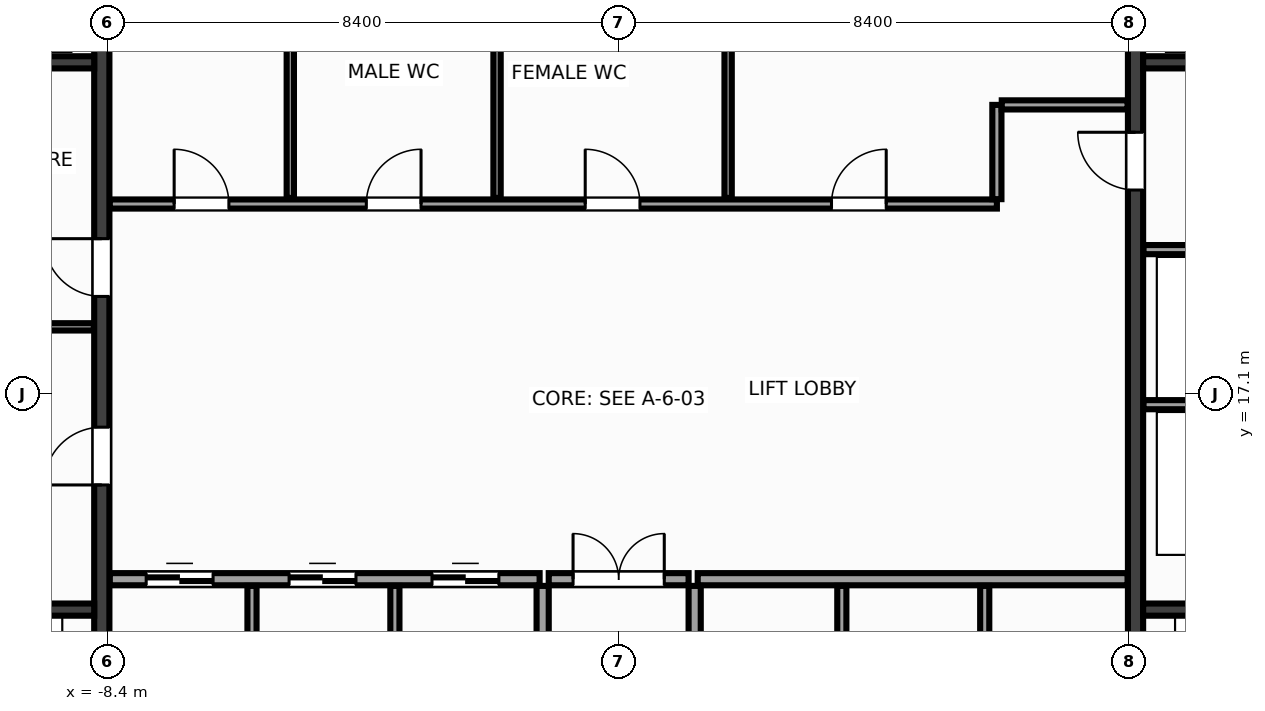
"""IFC4 building model, lengths in metres.
Left out: names, types, materials, properties, quantities, classifications, styles, units other than length and angle.
Written with IfcOpenShell. Run it as: python <this file> out.ifc"""

import sys

from ifc_helpers import new_model, si_unit, direction, frame, frame_2d, origin, place, context, subcontext, project, spatial, rectangle, extrude, source, transform, mapped, element, fill, save


model = new_model("IFC4")
c1 = context("Model", 3, precision=1e-05, world=origin(), true_north=direction((0.0, 1.0)))
c2 = subcontext(c1, "Body", "Model", "MODEL_VIEW")
j1 = project(units=[si_unit("LENGTHUNIT", "METRE"), si_unit("PLANEANGLEUNIT", "RADIAN")], contexts=[c1])
p1 = place(None, origin())
s1 = spatial("IfcSite", under=j1, at=p1, CompositionType="ELEMENT")
p2 = place(p1, origin())
s2 = spatial("IfcBuilding", under=s1, at=p2, CompositionType="ELEMENT")
p3 = place(p2, frame((0.0, 0.0, 41.6)))
s3 = spatial("IfcBuildingStorey", under=s2, at=p3, CompositionType="ELEMENT", Elevation=41.6)
m1 = source(origin(), c2, "Body", "SweptSolid", [
    extrude(rectangle(XDim=12.8, YDim=0.25, at=frame_2d((6.4, 0.0))), origin(), (0.0, 0.0, 1.0), 3.6),
])
p4 = place(p3, frame((-8.5, 10.6, 0.0), z_axis=(0.0, 0.0, 1.0), x_axis=(0.0, 1.0, 0.0)))
e1 = element("IfcWall", 1, at=p4, inside=s3, PredefinedType="SHEAR", context=c2, shape_type="MappedRepresentation", body=[
    mapped(m1, transform((0.0, 0.0, 0.0), x_axis=(1.0, 0.0, 0.0), y_axis=(0.0, 1.0, 0.0), z_axis=(0.0, 0.0, 1.0), scale=1.0)),
])
p5 = place(p4, frame((5.0, 0.0, 0.0)))
e2 = element("IfcOpeningElement", 2, at=p5, cuts=e1, PredefinedType="OPENING", context=c2, shape_type="SweptSolid", body=[
    extrude(rectangle(XDim=0.95, YDim=2.15, at=frame_2d((0.475, 1.075))), frame((0.0, 0.137, 0.0), z_axis=(0.0, -1.0, 0.0), x_axis=(1.0, 0.0, 0.0)), (0.0, 0.0, 1.0), 0.274),
])
p6 = place(p4, frame((8.1, 0.0, 0.0)))
e3 = element("IfcOpeningElement", 3, at=p6, cuts=e1, PredefinedType="OPENING", context=c2, shape_type="SweptSolid", body=[
    extrude(rectangle(XDim=0.95, YDim=2.15, at=frame_2d((0.475, 1.075))), frame((0.0, 0.137, 0.0), z_axis=(0.0, -1.0, 0.0), x_axis=(1.0, 0.0, 0.0)), (0.0, 0.0, 1.0), 0.274),
])
p7 = place(p3, frame((8.5, 10.6, 0.0), z_axis=(0.0, 0.0, 1.0), x_axis=(0.0, 1.0, 0.0)))
e4 = element("IfcWall", 4, at=p7, inside=s3, PredefinedType="SHEAR", context=c2, shape_type="MappedRepresentation", body=[
    mapped(m1, transform((0.0, 0.0, 0.0), x_axis=(1.0, 0.0, 0.0), y_axis=(0.0, 1.0, 0.0), z_axis=(0.0, 0.0, 1.0), scale=1.0)),
])
p8 = place(p7, frame((9.85, 0.0, 0.0)))
e5 = element("IfcOpeningElement", 5, at=p8, cuts=e4, PredefinedType="OPENING", context=c2, shape_type="SweptSolid", body=[
    extrude(rectangle(XDim=0.95, YDim=2.15, at=frame_2d((0.475, 1.075))), frame((0.0, 0.137, 0.0), z_axis=(0.0, -1.0, 0.0), x_axis=(1.0, 0.0, 0.0)), (0.0, 0.0, 1.0), 0.274),
])
m2 = source(origin(), c2, "Body", "SweptSolid", [
    extrude(rectangle(XDim=2.825, YDim=0.2, at=frame_2d((1.413, 0.0))), origin(), (0.0, 0.0, 1.0), 3.6),
])
for number, where, z_axis, x_axis in (
    (6, (-11.45, 13.55, 0.0), (0.0, 0.0, 1.0), (1.0, 0.0, 0.0)),
    (7, (8.625, 13.55, 0.0), (0.0, 0.0, 1.0), (1.0, 0.0, 0.0)),
):
    element("IfcWall", number, at=place(p3, frame(where, z_axis=z_axis, x_axis=x_axis)), inside=s3, PredefinedType="SHEAR", context=c2, shape_type="MappedRepresentation", body=[
        mapped(m2, transform((0.0, 0.0, 0.0), x_axis=(1.0, 0.0, 0.0), y_axis=(0.0, 1.0, 0.0), z_axis=(0.0, 0.0, 1.0), scale=1.0)),
    ])
m3 = source(origin(), c2, "Body", "SweptSolid", [
    extrude(rectangle(XDim=3.02, YDim=0.2, at=frame_2d((1.51, 0.0))), origin(), (0.0, 0.0, 1.0), 3.6),
])
for number, where, z_axis, x_axis in (
    (8, (-11.645, 22.55, 0.0), (0.0, 0.0, 1.0), (1.0, 0.0, 0.0)),
    (9, (8.625, 22.55, 0.0), (0.0, 0.0, 1.0), (1.0, 0.0, 0.0)),
):
    element("IfcWall", number, at=place(p3, frame(where, z_axis=z_axis, x_axis=x_axis)), inside=s3, PredefinedType="SHEAR", context=c2, shape_type="MappedRepresentation", body=[
        mapped(m3, transform((0.0, 0.0, 0.0), x_axis=(1.0, 0.0, 0.0), y_axis=(0.0, 1.0, 0.0), z_axis=(0.0, 0.0, 1.0), scale=1.0)),
    ])
m4 = source(origin(), c2, "Body", "SweptSolid", [
    extrude(rectangle(XDim=3.01, YDim=0.12, at=frame_2d((1.505, 0.0))), origin(), (0.0, 0.0, 1.0), 3.36),
])
p9 = place(p3, frame((-11.64, 18.2, 0.0), z_axis=(0.0, 0.0, 1.0), x_axis=(1.0, 0.0, 0.0)))
e10 = element("IfcWall", 10, at=p9, inside=s3, PredefinedType="PARTITIONING", context=c2, shape_type="MappedRepresentation", body=[
    mapped(m4, transform((0.0, 0.0, 0.0), x_axis=(1.0, 0.0, 0.0), y_axis=(0.0, 1.0, 0.0), z_axis=(0.0, 0.0, 1.0), scale=1.0)),
])
m5 = source(origin(), c2, "Body", "SweptSolid", [
    extrude(rectangle(XDim=3.01, YDim=0.15, at=frame_2d((1.505, 0.0))), origin(), (0.0, 0.0, 1.0), 3.36),
])
for number, where, z_axis, x_axis in (
    (11, (8.63, 16.92, 0.0), (0.0, 0.0, 1.0), (1.0, 0.0, 0.0)),
    (12, (8.63, 19.47, 0.0), (0.0, 0.0, 1.0), (1.0, 0.0, 0.0)),
):
    element("IfcWall", number, at=place(p3, frame(where, z_axis=z_axis, x_axis=x_axis)), inside=s3, PredefinedType="PARTITIONING", context=c2, shape_type="MappedRepresentation", body=[
        mapped(m5, transform((0.0, 0.0, 0.0), x_axis=(1.0, 0.0, 0.0), y_axis=(0.0, 1.0, 0.0), z_axis=(0.0, 0.0, 1.0), scale=1.0)),
    ])
m6 = source(origin(), c2, "Body", "SweptSolid", [
    extrude(rectangle(XDim=7.07, YDim=0.2, at=frame_2d((3.535, 0.0))), origin(), (0.0, 0.0, 1.0), 3.36),
])
p10 = place(p3, frame((-8.37, 14.05, 0.0), z_axis=(0.0, 0.0, 1.0), x_axis=(1.0, 0.0, 0.0)))
e13 = element("IfcWall", 13, at=p10, inside=s3, PredefinedType="PARTITIONING", context=c2, shape_type="MappedRepresentation", body=[
    mapped(m6, transform((0.0, 0.0, 0.0), x_axis=(1.0, 0.0, 0.0), y_axis=(0.0, 1.0, 0.0), z_axis=(0.0, 0.0, 1.0), scale=1.0)),
])
p11 = place(p10, frame((0.6, 0.0, 0.0)))
e14 = element("IfcOpeningElement", 14, at=p11, cuts=e13, PredefinedType="OPENING", context=c2, shape_type="SweptSolid", body=[
    extrude(rectangle(XDim=1.1, YDim=2.15, at=frame_2d((0.55, 1.075))), frame((0.0, 0.112, 0.0), z_axis=(0.0, -1.0, 0.0), x_axis=(1.0, 0.0, 0.0)), (0.0, 0.0, 1.0), 0.224),
])
p12 = place(p10, frame((2.95, 0.0, 0.0)))
e15 = element("IfcOpeningElement", 15, at=p12, cuts=e13, PredefinedType="OPENING", context=c2, shape_type="SweptSolid", body=[
    extrude(rectangle(XDim=1.1, YDim=2.15, at=frame_2d((0.55, 1.075))), frame((0.0, 0.112, 0.0), z_axis=(0.0, -1.0, 0.0), x_axis=(1.0, 0.0, 0.0)), (0.0, 0.0, 1.0), 0.224),
])
p13 = place(p10, frame((5.3, 0.0, 0.0)))
e16 = element("IfcOpeningElement", 16, at=p13, cuts=e13, PredefinedType="OPENING", context=c2, shape_type="SweptSolid", body=[
    extrude(rectangle(XDim=1.1, YDim=2.15, at=frame_2d((0.55, 1.075))), frame((0.0, 0.112, 0.0), z_axis=(0.0, -1.0, 0.0), x_axis=(1.0, 0.0, 0.0)), (0.0, 0.0, 1.0), 0.224),
])
p14 = place(p3, frame((1.3, 14.05, 0.0), z_axis=(0.0, 0.0, 1.0), x_axis=(1.0, 0.0, 0.0)))
e17 = element("IfcWall", 17, at=p14, inside=s3, PredefinedType="PARTITIONING", context=c2, shape_type="MappedRepresentation", body=[
    mapped(m6, transform((0.0, 0.0, 0.0), x_axis=(1.0, 0.0, 0.0), y_axis=(0.0, 1.0, 0.0), z_axis=(0.0, 0.0, 1.0), scale=1.0)),
])
m7 = source(origin(), c2, "Body", "SweptSolid", [
    extrude(rectangle(XDim=3.34, YDim=0.2, at=frame_2d((1.67, 0.0))), origin(), (0.0, 0.0, 1.0), 3.36),
])
for number, where, z_axis, x_axis in (
    (18, (-1.25, 10.6, 0.0), (0.0, 0.0, 1.0), (0.0, 1.0, 0.0)),
    (19, (1.25, 10.6, 0.0), (0.0, 0.0, 1.0), (0.0, 1.0, 0.0)),
):
    element("IfcWall", number, at=place(p3, frame(where, z_axis=z_axis, x_axis=x_axis)), inside=s3, PredefinedType="PARTITIONING", context=c2, shape_type="MappedRepresentation", body=[
        mapped(m7, transform((0.0, 0.0, 0.0), x_axis=(1.0, 0.0, 0.0), y_axis=(0.0, 1.0, 0.0), z_axis=(0.0, 0.0, 1.0), scale=1.0)),
    ])
m8 = source(origin(), c2, "Body", "SweptSolid", [
    extrude(rectangle(XDim=2.3, YDim=0.2, at=frame_2d((1.15, 0.0))), origin(), (0.0, 0.0, 1.0), 3.36),
])
p15 = place(p3, frame((-1.15, 14.05, 0.0), z_axis=(0.0, 0.0, 1.0), x_axis=(1.0, 0.0, 0.0)))
e20 = element("IfcWall", 20, at=p15, inside=s3, PredefinedType="PARTITIONING", context=c2, shape_type="MappedRepresentation", body=[
    mapped(m8, transform((0.0, 0.0, 0.0), x_axis=(1.0, 0.0, 0.0), y_axis=(0.0, 1.0, 0.0), z_axis=(0.0, 0.0, 1.0), scale=1.0)),
])
p16 = place(p15, frame((0.4, 0.0, 0.0)))
e21 = element("IfcOpeningElement", 21, at=p16, cuts=e20, PredefinedType="OPENING", context=c2, shape_type="SweptSolid", body=[
    extrude(rectangle(XDim=1.5, YDim=2.2, at=frame_2d((0.75, 1.1))), frame((0.0, 0.112, 0.0), z_axis=(0.0, -1.0, 0.0), x_axis=(1.0, 0.0, 0.0)), (0.0, 0.0, 1.0), 0.224),
])
m9 = source(origin(), c2, "Body", "SweptSolid", [
    extrude(rectangle(XDim=14.59, YDim=0.15, at=frame_2d((7.295, 0.0))), origin(), (0.0, 0.0, 1.0), 3.36),
])
p17 = place(p3, frame((-8.37, 20.22, 0.0), z_axis=(0.0, 0.0, 1.0), x_axis=(1.0, 0.0, 0.0)))
e22 = element("IfcWall", 22, at=p17, inside=s3, PredefinedType="PARTITIONING", context=c2, shape_type="MappedRepresentation", body=[
    mapped(m9, transform((0.0, 0.0, 0.0), x_axis=(1.0, 0.0, 0.0), y_axis=(0.0, 1.0, 0.0), z_axis=(0.0, 0.0, 1.0), scale=1.0)),
])
p18 = place(p17, frame((1.06, 0.0, 0.0)))
e23 = element("IfcOpeningElement", 23, at=p18, cuts=e22, PredefinedType="OPENING", context=c2, shape_type="SweptSolid", body=[
    extrude(rectangle(XDim=0.9, YDim=2.15, at=frame_2d((0.45, 1.075))), frame((0.0, 0.087, 0.0), z_axis=(0.0, -1.0, 0.0), x_axis=(1.0, 0.0, 0.0)), (0.0, 0.0, 1.0), 0.174),
])
p19 = place(p17, frame((4.22, 0.0, 0.0)))
e24 = element("IfcOpeningElement", 24, at=p19, cuts=e22, PredefinedType="OPENING", context=c2, shape_type="SweptSolid", body=[
    extrude(rectangle(XDim=0.9, YDim=2.15, at=frame_2d((0.45, 1.075))), frame((0.0, 0.087, 0.0), z_axis=(0.0, -1.0, 0.0), x_axis=(1.0, 0.0, 0.0)), (0.0, 0.0, 1.0), 0.174),
])
p20 = place(p17, frame((7.82, 0.0, 0.0)))
e25 = element("IfcOpeningElement", 25, at=p20, cuts=e22, PredefinedType="OPENING", context=c2, shape_type="SweptSolid", body=[
    extrude(rectangle(XDim=0.9, YDim=2.15, at=frame_2d((0.45, 1.075))), frame((0.0, 0.087, 0.0), z_axis=(0.0, -1.0, 0.0), x_axis=(1.0, 0.0, 0.0)), (0.0, 0.0, 1.0), 0.174),
])
p21 = place(p17, frame((11.87, 0.0, 0.0)))
e26 = element("IfcOpeningElement", 26, at=p21, cuts=e22, PredefinedType="OPENING", context=c2, shape_type="SweptSolid", body=[
    extrude(rectangle(XDim=0.9, YDim=2.15, at=frame_2d((0.45, 1.075))), frame((0.0, 0.087, 0.0), z_axis=(0.0, -1.0, 0.0), x_axis=(1.0, 0.0, 0.0)), (0.0, 0.0, 1.0), 0.174),
])
m10 = source(origin(), c2, "Body", "SweptSolid", [
    extrude(rectangle(XDim=1.55, YDim=0.15, at=frame_2d((0.775, 0.0))), origin(), (0.0, 0.0, 1.0), 3.36),
])
p22 = place(p3, frame((6.22, 20.3, 0.0), z_axis=(0.0, 0.0, 1.0), x_axis=(0.0, 1.0, 0.0)))
e27 = element("IfcWall", 27, at=p22, inside=s3, PredefinedType="PARTITIONING", context=c2, shape_type="MappedRepresentation", body=[
    mapped(m10, transform((0.0, 0.0, 0.0), x_axis=(1.0, 0.0, 0.0), y_axis=(0.0, 1.0, 0.0), z_axis=(0.0, 0.0, 1.0), scale=1.0)),
])
m11 = source(origin(), c2, "Body", "SweptSolid", [
    extrude(rectangle(XDim=2.07, YDim=0.15, at=frame_2d((1.035, 0.0))), origin(), (0.0, 0.0, 1.0), 3.36),
])
p23 = place(p3, frame((6.3, 21.85, 0.0), z_axis=(0.0, 0.0, 1.0), x_axis=(1.0, 0.0, 0.0)))
e28 = element("IfcWall", 28, at=p23, inside=s3, PredefinedType="PARTITIONING", context=c2, shape_type="MappedRepresentation", body=[
    mapped(m11, transform((0.0, 0.0, 0.0), x_axis=(1.0, 0.0, 0.0), y_axis=(0.0, 1.0, 0.0), z_axis=(0.0, 0.0, 1.0), scale=1.0)),
])
m12 = source(origin(), c2, "Body", "SweptSolid", [
    extrude(rectangle(XDim=3.34, YDim=0.15, at=frame_2d((1.67, 0.0))), origin(), (0.0, 0.0, 1.0), 3.36),
])
for number, where, z_axis, x_axis in (
    (29, (-6.03, 10.6, 0.0), (0.0, 0.0, 1.0), (0.0, 1.0, 0.0)),
    (30, (-3.68, 10.6, 0.0), (0.0, 0.0, 1.0), (0.0, 1.0, 0.0)),
    (31, (3.67, 10.6, 0.0), (0.0, 0.0, 1.0), (0.0, 1.0, 0.0)),
    (32, (6.02, 10.6, 0.0), (0.0, 0.0, 1.0), (0.0, 1.0, 0.0)),
):
    element("IfcWall", number, at=place(p3, frame(where, z_axis=z_axis, x_axis=x_axis)), inside=s3, PredefinedType="PARTITIONING", context=c2, shape_type="MappedRepresentation", body=[
        mapped(m12, transform((0.0, 0.0, 0.0), x_axis=(1.0, 0.0, 0.0), y_axis=(0.0, 1.0, 0.0), z_axis=(0.0, 0.0, 1.0), scale=1.0)),
    ])
m13 = source(origin(), c2, "Body", "SweptSolid", [
    extrude(rectangle(XDim=3.04, YDim=0.12, at=frame_2d((1.52, 0.0))), origin(), (0.0, 0.0, 1.0), 3.36),
])
for number, where, z_axis, x_axis in (
    (33, (-5.4, 20.32, 0.0), (0.0, 0.0, 1.0), (0.0, 1.0, 0.0)),
    (34, (-2.0, 20.32, 0.0), (0.0, 0.0, 1.0), (0.0, 1.0, 0.0)),
    (35, (1.8, 20.32, 0.0), (0.0, 0.0, 1.0), (0.0, 1.0, 0.0)),
):
    element("IfcWall", number, at=place(p3, frame(where, z_axis=z_axis, x_axis=x_axis)), inside=s3, PredefinedType="PARTITIONING", context=c2, shape_type="MappedRepresentation", body=[
        mapped(m13, transform((0.0, 0.0, 0.0), x_axis=(1.0, 0.0, 0.0), y_axis=(0.0, 1.0, 0.0), z_axis=(0.0, 0.0, 1.0), scale=1.0)),
    ])
m14 = source(origin(), c2, "Body", "SweptSolid", [
    extrude(rectangle(XDim=0.95, YDim=2.15, at=frame_2d((0.475, 1.075))), frame((0.0, 0.025, 0.0), z_axis=(0.0, -1.0, 0.0), x_axis=(1.0, 0.0, 0.0)), (0.0, 0.0, 1.0), 0.05),
])
p24 = place(p5, origin())
e36 = element("IfcDoor", 36, at=p24, inside=s3, OperationType="SINGLE_SWING_LEFT", PredefinedType="DOOR", context=c2, shape_type="MappedRepresentation", body=[
    mapped(m14, transform((0.0, 0.0, 0.0), x_axis=(1.0, 0.0, 0.0), y_axis=(0.0, 1.0, 0.0), z_axis=(0.0, 0.0, 1.0), scale=1.0)),
])
fill(e2, e36)
p25 = place(p6, origin())
e37 = element("IfcDoor", 37, at=p25, inside=s3, OperationType="SINGLE_SWING_RIGHT", PredefinedType="DOOR", context=c2, shape_type="MappedRepresentation", body=[
    mapped(m14, transform((0.0, 0.0, 0.0), x_axis=(1.0, 0.0, 0.0), y_axis=(0.0, 1.0, 0.0), z_axis=(0.0, 0.0, 1.0), scale=1.0)),
])
fill(e3, e37)
m15 = source(origin(), c2, "Body", "SweptSolid", [
    extrude(rectangle(XDim=0.95, YDim=2.15, at=frame_2d((0.475, 1.075))), frame((0.0, 0.025, 0.0), z_axis=(0.0, -1.0, 0.0), x_axis=(1.0, 0.0, 0.0)), (0.0, 0.0, 1.0), 0.05),
])
p26 = place(p8, origin())
e38 = element("IfcDoor", 38, at=p26, inside=s3, OperationType="SINGLE_SWING_RIGHT", PredefinedType="DOOR", context=c2, shape_type="MappedRepresentation", body=[
    mapped(m15, transform((0.0, 0.0, 0.0), x_axis=(1.0, 0.0, 0.0), y_axis=(0.0, 1.0, 0.0), z_axis=(0.0, 0.0, 1.0), scale=1.0)),
])
fill(e5, e38)
m16 = source(origin(), c2, "Body", "SweptSolid", [
    extrude(rectangle(XDim=1.1, YDim=2.15, at=frame_2d((0.55, 1.075))), frame((0.0, 0.025, 0.0), z_axis=(0.0, -1.0, 0.0), x_axis=(1.0, 0.0, 0.0)), (0.0, 0.0, 1.0), 0.05),
])
p27 = place(p11, origin())
e39 = element("IfcDoor", 39, at=p27, inside=s3, OperationType="DOUBLE_DOOR_SLIDING", PredefinedType="DOOR", context=c2, shape_type="MappedRepresentation", body=[
    mapped(m16, transform((0.0, 0.0, 0.0), x_axis=(1.0, 0.0, 0.0), y_axis=(0.0, 1.0, 0.0), z_axis=(0.0, 0.0, 1.0), scale=1.0)),
])
fill(e14, e39)
p28 = place(p12, origin())
e40 = element("IfcDoor", 40, at=p28, inside=s3, OperationType="DOUBLE_DOOR_SLIDING", PredefinedType="DOOR", context=c2, shape_type="MappedRepresentation", body=[
    mapped(m16, transform((0.0, 0.0, 0.0), x_axis=(1.0, 0.0, 0.0), y_axis=(0.0, 1.0, 0.0), z_axis=(0.0, 0.0, 1.0), scale=1.0)),
])
fill(e15, e40)
p29 = place(p13, origin())
e41 = element("IfcDoor", 41, at=p29, inside=s3, OperationType="DOUBLE_DOOR_SLIDING", PredefinedType="DOOR", context=c2, shape_type="MappedRepresentation", body=[
    mapped(m16, transform((0.0, 0.0, 0.0), x_axis=(1.0, 0.0, 0.0), y_axis=(0.0, 1.0, 0.0), z_axis=(0.0, 0.0, 1.0), scale=1.0)),
])
fill(e16, e41)
m17 = source(origin(), c2, "Body", "SweptSolid", [
    extrude(rectangle(XDim=1.5, YDim=2.2, at=frame_2d((0.75, 1.1))), frame((0.0, 0.025, 0.0), z_axis=(0.0, -1.0, 0.0), x_axis=(1.0, 0.0, 0.0)), (0.0, 0.0, 1.0), 0.05),
])
p30 = place(p16, origin())
e42 = element("IfcDoor", 42, at=p30, inside=s3, OperationType="DOUBLE_DOOR_SINGLE_SWING", PredefinedType="DOOR", context=c2, shape_type="MappedRepresentation", body=[
    mapped(m17, transform((0.0, 0.0, 0.0), x_axis=(1.0, 0.0, 0.0), y_axis=(0.0, 1.0, 0.0), z_axis=(0.0, 0.0, 1.0), scale=1.0)),
])
fill(e21, e42)
m18 = source(origin(), c2, "Body", "SweptSolid", [
    extrude(rectangle(XDim=0.9, YDim=2.15, at=frame_2d((0.45, 1.075))), frame((0.0, 0.025, 0.0), z_axis=(0.0, -1.0, 0.0), x_axis=(1.0, 0.0, 0.0)), (0.0, 0.0, 1.0), 0.05),
])
p31 = place(p18, origin())
e43 = element("IfcDoor", 43, at=p31, inside=s3, OperationType="SINGLE_SWING_LEFT", PredefinedType="DOOR", context=c2, shape_type="MappedRepresentation", body=[
    mapped(m18, transform((0.0, 0.0, 0.0), x_axis=(1.0, 0.0, 0.0), y_axis=(0.0, 1.0, 0.0), z_axis=(0.0, 0.0, 1.0), scale=1.0)),
])
fill(e23, e43)
p32 = place(p19, origin())
e44 = element("IfcDoor", 44, at=p32, inside=s3, OperationType="SINGLE_SWING_RIGHT", PredefinedType="DOOR", context=c2, shape_type="MappedRepresentation", body=[
    mapped(m18, transform((0.0, 0.0, 0.0), x_axis=(1.0, 0.0, 0.0), y_axis=(0.0, 1.0, 0.0), z_axis=(0.0, 0.0, 1.0), scale=1.0)),
])
fill(e24, e44)
p33 = place(p20, origin())
e45 = element("IfcDoor", 45, at=p33, inside=s3, OperationType="SINGLE_SWING_LEFT", PredefinedType="DOOR", context=c2, shape_type="MappedRepresentation", body=[
    mapped(m18, transform((0.0, 0.0, 0.0), x_axis=(1.0, 0.0, 0.0), y_axis=(0.0, 1.0, 0.0), z_axis=(0.0, 0.0, 1.0), scale=1.0)),
])
fill(e25, e45)
p34 = place(p21, origin())
e46 = element("IfcDoor", 46, at=p34, inside=s3, OperationType="SINGLE_SWING_RIGHT", PredefinedType="DOOR", context=c2, shape_type="MappedRepresentation", body=[
    mapped(m18, transform((0.0, 0.0, 0.0), x_axis=(1.0, 0.0, 0.0), y_axis=(0.0, 1.0, 0.0), z_axis=(0.0, 0.0, 1.0), scale=1.0)),
])
fill(e26, e46)
save(model, sys.argv[1])
